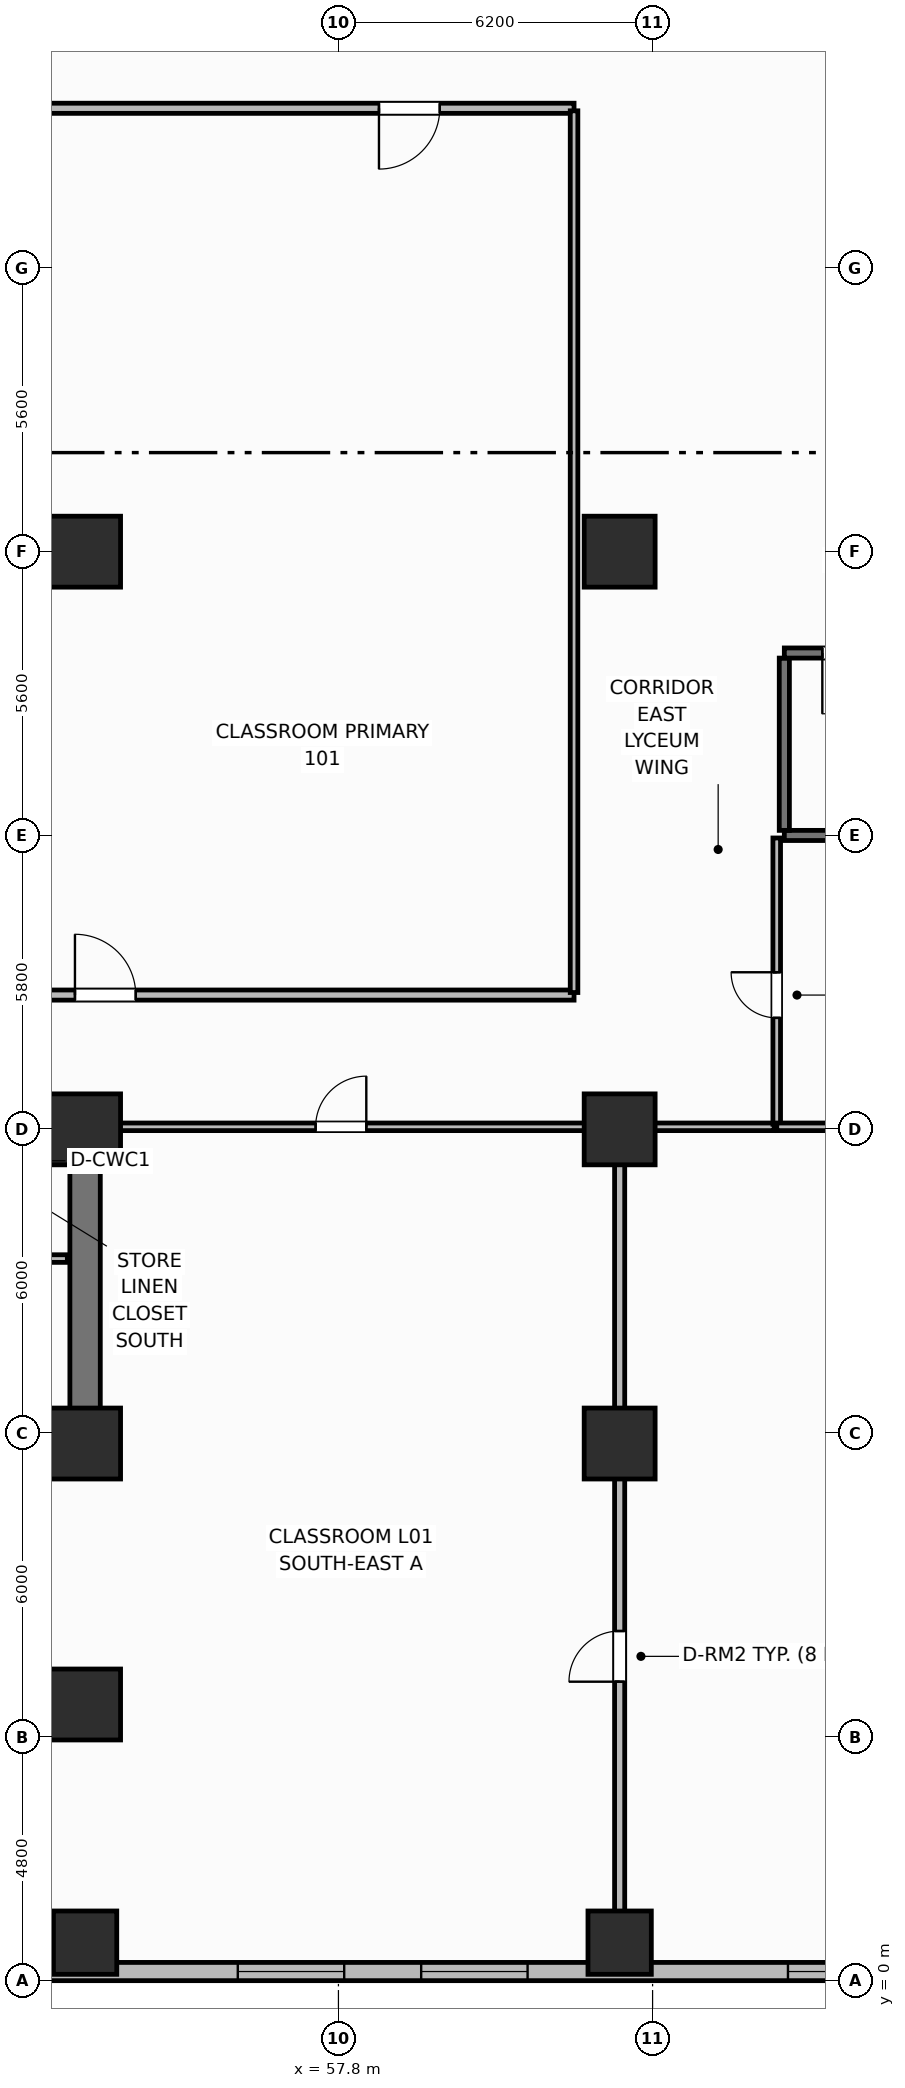
"""IFC4 building model, lengths in metres.
Left out: names, types, materials, properties, quantities, classifications, styles, units other than length and angle.
Written with IfcOpenShell. Run it as: python <this file> out.ifc"""

import sys

from ifc_helpers import new_model, si_unit, direction, frame, frame_2d, origin, origin_2d, place, context, subcontext, project, spatial, rectangle, extrude, element, fill, save


model = new_model("IFC4")
c1 = context("Model", 3, precision=1e-05, world=origin(), true_north=direction((0.0, 1.0)))
c2 = subcontext(c1, "Body", "Model", "MODEL_VIEW")
j1 = project(units=[si_unit("LENGTHUNIT", "METRE"), si_unit("PLANEANGLEUNIT", "RADIAN")], contexts=[c1])
p1 = place(None, origin())
s1 = spatial("IfcSite", under=j1, at=p1, CompositionType="ELEMENT")
p2 = place(p1, origin())
s2 = spatial("IfcBuilding", under=s1, at=p2, CompositionType="ELEMENT")
p3 = place(p2, frame((0.0, 0.0, 6.6)))
s3 = spatial("IfcBuildingStorey", under=s2, at=p3, CompositionType="ELEMENT", Elevation=6.6)
p4 = place(p3, frame((52.8, 10.6, 0.0), z_axis=(0.0, 0.0, 1.0), x_axis=(-1.0, 0.0, 0.0)))
e1 = element("IfcWall", 1, at=p4, inside=s3, PredefinedType="SHEAR", context=c2, shape_type="SweptSolid", body=[
    extrude(rectangle(XDim=27.2, YDim=0.6, at=frame_2d((13.6, 0.0))), origin(), (0.0, 0.0, 1.0), 4.5),
])
p5 = place(p3, frame((52.8, 10.9, 0.0), z_axis=(0.0, 0.0, 1.0), x_axis=(0.0, 1.0, 0.0)))
e2 = element("IfcWall", 2, at=p5, inside=s3, PredefinedType="SHEAR", context=c2, shape_type="SweptSolid", body=[
    extrude(rectangle(XDim=5.6, YDim=0.6, at=frame_2d((2.8, 0.0))), origin(), (0.0, 0.0, 1.0), 4.5),
])
p6 = place(p3, frame((25.6, 16.8, 0.0), z_axis=(0.0, 0.0, 1.0), x_axis=(1.0, 0.0, 0.0)))
e3 = element("IfcWall", 3, at=p6, inside=s3, PredefinedType="SHEAR", context=c2, shape_type="SweptSolid", body=[
    extrude(rectangle(XDim=27.2, YDim=0.6, at=frame_2d((13.6, 0.0))), origin(), (0.0, 0.0, 1.0), 4.5),
])
p7 = place(p6, frame((1.8, 0.0, 0.0)))
e4 = element("IfcOpeningElement", 4, at=p7, cuts=e3, PredefinedType="OPENING", context=c2, shape_type="SweptSolid", body=[
    extrude(rectangle(XDim=1.1, YDim=2.15, at=frame_2d((0.55, 1.075))), frame((0.0, 0.31, 0.0), z_axis=(0.0, -1.0, 0.0), x_axis=(1.0, 0.0, 0.0)), (0.0, 0.0, 1.0), 0.62),
])
p8 = place(p6, frame((5.6, 0.0, 0.0)))
e5 = element("IfcOpeningElement", 5, at=p8, cuts=e3, PredefinedType="OPENING", context=c2, shape_type="SweptSolid", body=[
    extrude(rectangle(XDim=0.85, YDim=2.1, at=frame_2d((0.425, 1.05))), frame((0.0, 0.31, 0.0), z_axis=(0.0, -1.0, 0.0), x_axis=(1.0, 0.0, 0.0)), (0.0, 0.0, 1.0), 0.62),
])
p9 = place(p6, frame((13.0, 0.0, 0.0)))
e6 = element("IfcOpeningElement", 6, at=p9, cuts=e3, PredefinedType="OPENING", context=c2, shape_type="SweptSolid", body=[
    extrude(rectangle(XDim=1.2, YDim=2.15, at=frame_2d((0.6, 1.075))), frame((0.0, 0.31, 0.0), z_axis=(0.0, -1.0, 0.0), x_axis=(1.0, 0.0, 0.0)), (0.0, 0.0, 1.0), 0.62),
])
p10 = place(p6, frame((20.4, 0.0, 0.0)))
e7 = element("IfcOpeningElement", 7, at=p10, cuts=e3, PredefinedType="OPENING", context=c2, shape_type="SweptSolid", body=[
    extrude(rectangle(XDim=1.3, YDim=2.2, at=frame_2d((0.65, 1.1))), frame((0.0, 0.31, 0.0), z_axis=(0.0, -1.0, 0.0), x_axis=(1.0, 0.0, 0.0)), (0.0, 0.0, 1.0), 0.62),
])
p11 = place(p6, frame((24.65, 0.0, 0.0)))
e8 = element("IfcOpeningElement", 8, at=p11, cuts=e3, PredefinedType="OPENING", context=c2, shape_type="SweptSolid", body=[
    extrude(rectangle(XDim=0.85, YDim=2.1, at=frame_2d((0.425, 1.05))), frame((0.0, 0.31, 0.0), z_axis=(0.0, -1.0, 0.0), x_axis=(1.0, 0.0, 0.0)), (0.0, 0.0, 1.0), 0.62),
])
for number, where, z_axis, x_axis in (
    (9, (52.8, 10.6, 0.0), (0.0, 0.0, 1.0), (1.0, 0.0, 0.0)),
    (10, (52.8, 16.8, 0.0), (0.0, 0.0, 1.0), (1.0, 0.0, 0.0)),
    (11, (52.8, 28.2, 0.0), (0.0, 0.0, 1.0), (1.0, 0.0, 0.0)),
):
    element("IfcColumn", number, at=place(p3, frame(where, z_axis=z_axis, x_axis=x_axis)), inside=s3, PredefinedType="COLUMN", context=c2, shape_type="SweptSolid", body=[
        extrude(rectangle(XDim=1.4, YDim=1.4, at=origin_2d()), origin(), (0.0, 0.0, 1.0), 4.5),
    ])
for number, where, z_axis, x_axis in (
    (12, (52.8, 0.75, 0.0), (0.0, 0.0, 1.0), (1.0, 0.0, 0.0)),
    (13, (63.35, 0.75, 0.0), (0.0, 0.0, 1.0), (1.0, 0.0, 0.0)),
):
    element("IfcColumn", number, at=place(p3, frame(where, z_axis=z_axis, x_axis=x_axis)), inside=s3, PredefinedType="COLUMN", context=c2, shape_type="SweptSolid", body=[
        extrude(rectangle(XDim=1.25, YDim=1.25, at=origin_2d()), origin(), (0.0, 0.0, 1.0), 4.5),
    ])
for number, where, z_axis, x_axis in (
    (14, (52.8, 5.45, 0.0), (0.0, 0.0, 1.0), (1.0, 0.0, 0.0)),
    (15, (63.35, 10.6, 0.0), (0.0, 0.0, 1.0), (1.0, 0.0, 0.0)),
    (16, (63.35, 16.8, 0.0), (0.0, 0.0, 1.0), (1.0, 0.0, 0.0)),
    (17, (63.35, 28.2, 0.0), (0.0, 0.0, 1.0), (1.0, 0.0, 0.0)),
):
    element("IfcColumn", number, at=place(p3, frame(where, z_axis=z_axis, x_axis=x_axis)), inside=s3, PredefinedType="COLUMN", context=c2, shape_type="SweptSolid", body=[
        extrude(rectangle(XDim=1.4, YDim=1.4, at=origin_2d()), origin(), (0.0, 0.0, 1.0), 4.5),
    ])
p12 = place(p3, frame((21.83, 0.18, 0.0), z_axis=(0.0, 0.0, 1.0), x_axis=(1.0, 0.0, 0.0)))
e18 = element("IfcWall", 18, at=p12, inside=s3, PredefinedType="SOLIDWALL", context=c2, shape_type="SweptSolid", body=[
    extrude(rectangle(XDim=55.59, YDim=0.36, at=frame_2d((27.795, 0.0))), origin(), (0.0, 0.0, 1.0), 3.48),
])
p13 = place(p12, frame((5.029, 0.0, 0.85)))
e19 = element("IfcOpeningElement", 19, at=p13, cuts=e18, PredefinedType="OPENING", context=c2, shape_type="SweptSolid", body=[
    extrude(rectangle(XDim=2.1, YDim=2.2, at=frame_2d((1.05, 1.1))), frame((0.0, 0.19, 0.0), z_axis=(0.0, -1.0, 0.0), x_axis=(1.0, 0.0, 0.0)), (0.0, 0.0, 1.0), 0.38),
])
p14 = place(p12, frame((8.648, 0.0, 0.85)))
e20 = element("IfcOpeningElement", 20, at=p14, cuts=e18, PredefinedType="OPENING", context=c2, shape_type="SweptSolid", body=[
    extrude(rectangle(XDim=2.1, YDim=2.2, at=frame_2d((1.05, 1.1))), frame((0.0, 0.19, 0.0), z_axis=(0.0, -1.0, 0.0), x_axis=(1.0, 0.0, 0.0)), (0.0, 0.0, 1.0), 0.38),
])
p15 = place(p12, frame((12.268, 0.0, 0.85)))
e21 = element("IfcOpeningElement", 21, at=p15, cuts=e18, PredefinedType="OPENING", context=c2, shape_type="SweptSolid", body=[
    extrude(rectangle(XDim=2.1, YDim=2.2, at=frame_2d((1.05, 1.1))), frame((0.0, 0.19, 0.0), z_axis=(0.0, -1.0, 0.0), x_axis=(1.0, 0.0, 0.0)), (0.0, 0.0, 1.0), 0.38),
])
p16 = place(p12, frame((19.506, 0.0, 0.85)))
e22 = element("IfcOpeningElement", 22, at=p16, cuts=e18, PredefinedType="OPENING", context=c2, shape_type="SweptSolid", body=[
    extrude(rectangle(XDim=2.1, YDim=2.2, at=frame_2d((1.05, 1.1))), frame((0.0, 0.19, 0.0), z_axis=(0.0, -1.0, 0.0), x_axis=(1.0, 0.0, 0.0)), (0.0, 0.0, 1.0), 0.38),
])
p17 = place(p12, frame((23.126, 0.0, 0.85)))
e23 = element("IfcOpeningElement", 23, at=p17, cuts=e18, PredefinedType="OPENING", context=c2, shape_type="SweptSolid", body=[
    extrude(rectangle(XDim=2.1, YDim=2.2, at=frame_2d((1.05, 1.1))), frame((0.0, 0.19, 0.0), z_axis=(0.0, -1.0, 0.0), x_axis=(1.0, 0.0, 0.0)), (0.0, 0.0, 1.0), 0.38),
])
p18 = place(p12, frame((26.745, 0.0, 0.85)))
e24 = element("IfcOpeningElement", 24, at=p18, cuts=e18, PredefinedType="OPENING", context=c2, shape_type="SweptSolid", body=[
    extrude(rectangle(XDim=2.1, YDim=2.2, at=frame_2d((1.05, 1.1))), frame((0.0, 0.19, 0.0), z_axis=(0.0, -1.0, 0.0), x_axis=(1.0, 0.0, 0.0)), (0.0, 0.0, 1.0), 0.38),
])
p19 = place(p12, frame((33.984, 0.0, 0.85)))
e25 = element("IfcOpeningElement", 25, at=p19, cuts=e18, PredefinedType="OPENING", context=c2, shape_type="SweptSolid", body=[
    extrude(rectangle(XDim=2.1, YDim=2.2, at=frame_2d((1.05, 1.1))), frame((0.0, 0.19, 0.0), z_axis=(0.0, -1.0, 0.0), x_axis=(1.0, 0.0, 0.0)), (0.0, 0.0, 1.0), 0.38),
])
p20 = place(p12, frame((37.603, 0.0, 0.85)))
e26 = element("IfcOpeningElement", 26, at=p20, cuts=e18, PredefinedType="OPENING", context=c2, shape_type="SweptSolid", body=[
    extrude(rectangle(XDim=2.1, YDim=2.2, at=frame_2d((1.05, 1.1))), frame((0.0, 0.19, 0.0), z_axis=(0.0, -1.0, 0.0), x_axis=(1.0, 0.0, 0.0)), (0.0, 0.0, 1.0), 0.38),
])
p21 = place(p12, frame((44.842, 0.0, 0.85)))
e27 = element("IfcOpeningElement", 27, at=p21, cuts=e18, PredefinedType="OPENING", context=c2, shape_type="SweptSolid", body=[
    extrude(rectangle(XDim=2.1, YDim=2.2, at=frame_2d((1.05, 1.1))), frame((0.0, 0.19, 0.0), z_axis=(0.0, -1.0, 0.0), x_axis=(1.0, 0.0, 0.0)), (0.0, 0.0, 1.0), 0.38),
])
p22 = place(p12, frame((52.08, 0.0, 0.85)))
e28 = element("IfcOpeningElement", 28, at=p22, cuts=e18, PredefinedType="OPENING", context=c2, shape_type="SweptSolid", body=[
    extrude(rectangle(XDim=2.1, YDim=2.2, at=frame_2d((1.05, 1.1))), frame((0.0, 0.19, 0.0), z_axis=(0.0, -1.0, 0.0), x_axis=(1.0, 0.0, 0.0)), (0.0, 0.0, 1.0), 0.38),
])
p23 = place(p3, frame((49.6, 14.25, 0.0), z_axis=(0.0, 0.0, 1.0), x_axis=(1.0, 0.0, 0.0)))
e29 = element("IfcWall", 29, at=p23, inside=s3, PredefinedType="PARTITIONING", context=c2, shape_type="SweptSolid", body=[
    extrude(rectangle(XDim=2.85, YDim=0.15, at=frame_2d((1.425, 0.0))), origin(), (0.0, 0.0, 1.0), 3.42),
])
p24 = place(p23, frame((0.9, 0.0, 0.0)))
e30 = element("IfcOpeningElement", 30, at=p24, cuts=e29, PredefinedType="OPENING", context=c2, shape_type="SweptSolid", body=[
    extrude(rectangle(XDim=0.85, YDim=2.1, at=frame_2d((0.425, 1.05))), frame((0.0, 0.085, 0.0), z_axis=(0.0, -1.0, 0.0), x_axis=(1.0, 0.0, 0.0)), (0.0, 0.0, 1.0), 0.17),
])
p25 = place(p3, frame((66.6, 22.6, 0.0), z_axis=(0.0, 0.0, 1.0), x_axis=(1.0, 0.0, 0.0)))
e31 = element("IfcWall", 31, at=p25, inside=s3, PredefinedType="SHEAR", context=c2, shape_type="SweptSolid", body=[
    extrude(rectangle(XDim=9.0, YDim=0.2, at=frame_2d((4.5, 0.0))), origin(), (0.0, 0.0, 1.0), 4.5),
])
p26 = place(p3, frame((66.6, 22.7, 0.0), z_axis=(0.0, 0.0, 1.0), x_axis=(0.0, 1.0, 0.0)))
e32 = element("IfcWall", 32, at=p26, inside=s3, PredefinedType="SHEAR", context=c2, shape_type="SweptSolid", body=[
    extrude(rectangle(XDim=3.4, YDim=0.2, at=frame_2d((1.7, 0.0))), origin(), (0.0, 0.0, 1.0), 4.5),
])
p27 = place(p3, frame((75.6, 26.2, 0.0), z_axis=(0.0, 0.0, 1.0), x_axis=(-1.0, 0.0, 0.0)))
e33 = element("IfcWall", 33, at=p27, inside=s3, PredefinedType="SHEAR", context=c2, shape_type="SweptSolid", body=[
    extrude(rectangle(XDim=9.0, YDim=0.2, at=frame_2d((4.5, 0.0))), origin(), (0.0, 0.0, 1.0), 4.5),
])
p28 = place(p27, frame((7.05, 0.0, 0.0)))
e34 = element("IfcOpeningElement", 34, at=p28, cuts=e33, PredefinedType="OPENING", context=c2, shape_type="SweptSolid", body=[
    extrude(rectangle(XDim=1.2, YDim=2.15, at=frame_2d((0.6, 1.075))), frame((0.0, 0.11, 0.0), z_axis=(0.0, -1.0, 0.0), x_axis=(1.0, 0.0, 0.0)), (0.0, 0.0, 1.0), 0.22),
])
p29 = place(p3, frame((15.95, 19.45, 0.0), z_axis=(0.0, 0.0, 1.0), x_axis=(1.0, 0.0, 0.0)))
e35 = element("IfcWall", 35, at=p29, inside=s3, PredefinedType="PARTITIONING", context=c2, shape_type="SweptSolid", body=[
    extrude(rectangle(XDim=46.5, YDim=0.2, at=frame_2d((23.25, 0.0))), origin(), (0.0, 0.0, 1.0), 3.42),
])
p30 = place(p29, frame((2.65, 0.0, 0.0)))
e36 = element("IfcOpeningElement", 36, at=p30, cuts=e35, PredefinedType="OPENING", context=c2, shape_type="SweptSolid", body=[
    extrude(rectangle(XDim=1.2, YDim=2.15, at=frame_2d((0.6, 1.075))), frame((0.0, 0.11, 0.0), z_axis=(0.0, -1.0, 0.0), x_axis=(1.0, 0.0, 0.0)), (0.0, 0.0, 1.0), 0.22),
])
p31 = place(p29, frame((22.85, 0.0, 0.0)))
e37 = element("IfcOpeningElement", 37, at=p31, cuts=e35, PredefinedType="OPENING", context=c2, shape_type="SweptSolid", body=[
    extrude(rectangle(XDim=1.2, YDim=2.15, at=frame_2d((0.6, 1.075))), frame((0.0, 0.11, 0.0), z_axis=(0.0, -1.0, 0.0), x_axis=(1.0, 0.0, 0.0)), (0.0, 0.0, 1.0), 0.22),
])
p32 = place(p29, frame((36.65, 0.0, 0.0)))
e38 = element("IfcOpeningElement", 38, at=p32, cuts=e35, PredefinedType="OPENING", context=c2, shape_type="SweptSolid", body=[
    extrude(rectangle(XDim=1.2, YDim=2.15, at=frame_2d((0.6, 1.075))), frame((0.0, 0.11, 0.0), z_axis=(0.0, -1.0, 0.0), x_axis=(1.0, 0.0, 0.0)), (0.0, 0.0, 1.0), 0.22),
])
p33 = place(p3, frame((62.45, 36.95, 0.0), z_axis=(0.0, 0.0, 1.0), x_axis=(-1.0, 0.0, 0.0)))
e39 = element("IfcWall", 39, at=p33, inside=s3, PredefinedType="PARTITIONING", context=c2, shape_type="SweptSolid", body=[
    extrude(rectangle(XDim=46.5, YDim=0.2, at=frame_2d((23.25, 0.0))), origin(), (0.0, 0.0, 1.0), 3.42),
])
p34 = place(p33, frame((29.05, 0.0, 0.0)))
e40 = element("IfcOpeningElement", 40, at=p34, cuts=e39, PredefinedType="OPENING", context=c2, shape_type="SweptSolid", body=[
    extrude(rectangle(XDim=1.2, YDim=2.15, at=frame_2d((0.6, 1.075))), frame((0.0, 0.11, 0.0), z_axis=(0.0, -1.0, 0.0), x_axis=(1.0, 0.0, 0.0)), (0.0, 0.0, 1.0), 0.22),
])
p35 = place(p33, frame((15.25, 0.0, 0.0)))
e41 = element("IfcOpeningElement", 41, at=p35, cuts=e39, PredefinedType="OPENING", context=c2, shape_type="SweptSolid", body=[
    extrude(rectangle(XDim=1.2, YDim=2.15, at=frame_2d((0.6, 1.075))), frame((0.0, 0.11, 0.0), z_axis=(0.0, -1.0, 0.0), x_axis=(1.0, 0.0, 0.0)), (0.0, 0.0, 1.0), 0.22),
])
p36 = place(p33, frame((2.65, 0.0, 0.0)))
e42 = element("IfcOpeningElement", 42, at=p36, cuts=e39, PredefinedType="OPENING", context=c2, shape_type="SweptSolid", body=[
    extrude(rectangle(XDim=1.2, YDim=2.15, at=frame_2d((0.6, 1.075))), frame((0.0, 0.11, 0.0), z_axis=(0.0, -1.0, 0.0), x_axis=(1.0, 0.0, 0.0)), (0.0, 0.0, 1.0), 0.22),
])
p37 = place(p3, frame((62.45, 19.5, 0.0), z_axis=(0.0, 0.0, 1.0), x_axis=(0.0, 1.0, 0.0)))
e43 = element("IfcWall", 43, at=p37, inside=s3, PredefinedType="PARTITIONING", context=c2, shape_type="SweptSolid", body=[
    extrude(rectangle(XDim=17.4, YDim=0.15, at=frame_2d((8.7, 0.0))), origin(), (0.0, 0.0, 1.0), 3.42),
])
p38 = place(p3, frame((63.35, 0.4, 0.0), z_axis=(0.0, 0.0, 1.0), x_axis=(0.0, 1.0, 0.0)))
e44 = element("IfcWall", 44, at=p38, inside=s3, PredefinedType="PARTITIONING", context=c2, shape_type="SweptSolid", body=[
    extrude(rectangle(XDim=16.4, YDim=0.2, at=frame_2d((8.2, 0.0))), origin(), (0.0, 0.0, 1.0), 3.42),
])
p39 = place(p38, frame((5.5, 0.0, 0.0)))
e45 = element("IfcOpeningElement", 45, at=p39, cuts=e44, PredefinedType="OPENING", context=c2, shape_type="SweptSolid", body=[
    extrude(rectangle(XDim=1.0, YDim=2.15, at=frame_2d((0.5, 1.075))), frame((0.0, 0.11, 0.0), z_axis=(0.0, -1.0, 0.0), x_axis=(1.0, 0.0, 0.0)), (0.0, 0.0, 1.0), 0.22),
])
p40 = place(p3, frame((53.15, 16.85, 0.0), z_axis=(0.0, 0.0, 1.0), x_axis=(1.0, 0.0, 0.0)))
e46 = element("IfcWall", 46, at=p40, inside=s3, PredefinedType="PARTITIONING", context=c2, shape_type="SweptSolid", body=[
    extrude(rectangle(XDim=13.25, YDim=0.15, at=frame_2d((6.625, 0.0))), origin(), (0.0, 0.0, 1.0), 3.42),
])
p41 = place(p40, frame((4.2, 0.0, 0.0)))
e47 = element("IfcOpeningElement", 47, at=p41, cuts=e46, PredefinedType="OPENING", context=c2, shape_type="SweptSolid", body=[
    extrude(rectangle(XDim=1.0, YDim=2.15, at=frame_2d((0.5, 1.075))), frame((0.0, 0.085, 0.0), z_axis=(0.0, -1.0, 0.0), x_axis=(1.0, 0.0, 0.0)), (0.0, 0.0, 1.0), 0.17),
])
p42 = place(p3, frame((66.45, 16.9, 0.0), z_axis=(0.0, 0.0, 1.0), x_axis=(0.0, 1.0, 0.0)))
e48 = element("IfcWall", 48, at=p42, inside=s3, PredefinedType="PARTITIONING", context=c2, shape_type="SweptSolid", body=[
    extrude(rectangle(XDim=5.65, YDim=0.15, at=frame_2d((2.825, 0.0))), origin(), (0.0, 0.0, 1.0), 3.42),
])
p43 = place(p42, frame((2.1, 0.0, 0.0)))
e49 = element("IfcOpeningElement", 49, at=p43, cuts=e48, PredefinedType="OPENING", context=c2, shape_type="SweptSolid", body=[
    extrude(rectangle(XDim=0.9, YDim=2.1, at=frame_2d((0.45, 1.05))), frame((0.0, 0.085, 0.0), z_axis=(0.0, -1.0, 0.0), x_axis=(1.0, 0.0, 0.0)), (0.0, 0.0, 1.0), 0.17),
])
p44 = place(p3, frame((66.45, 16.85, 0.0), z_axis=(0.0, 0.0, 1.0), x_axis=(1.0, 0.0, 0.0)))
e50 = element("IfcWall", 50, at=p44, inside=s3, PredefinedType="PARTITIONING", context=c2, shape_type="SweptSolid", body=[
    extrude(rectangle(XDim=11.55, YDim=0.15, at=frame_2d((5.775, 0.0))), origin(), (0.0, 0.0, 1.0), 3.42),
])
p45 = place(p19, origin())
e51 = element("IfcWindow", 51, at=p45, inside=s3, PartitioningType="SINGLE_PANEL", PredefinedType="WINDOW", context=c2, shape_type="SweptSolid", body=[
    extrude(rectangle(XDim=2.1, YDim=2.2, at=frame_2d((1.05, 1.1))), frame((0.0, 0.03, 0.0), z_axis=(0.0, -1.0, 0.0), x_axis=(1.0, 0.0, 0.0)), (0.0, 0.0, 1.0), 0.06),
])
fill(e25, e51)
p46 = place(p20, origin())
e52 = element("IfcWindow", 52, at=p46, inside=s3, PartitioningType="SINGLE_PANEL", PredefinedType="WINDOW", context=c2, shape_type="SweptSolid", body=[
    extrude(rectangle(XDim=2.1, YDim=2.2, at=frame_2d((1.05, 1.1))), frame((0.0, 0.03, 0.0), z_axis=(0.0, -1.0, 0.0), x_axis=(1.0, 0.0, 0.0)), (0.0, 0.0, 1.0), 0.06),
])
fill(e26, e52)
p47 = place(p21, origin())
e53 = element("IfcWindow", 53, at=p47, inside=s3, PartitioningType="SINGLE_PANEL", PredefinedType="WINDOW", context=c2, shape_type="SweptSolid", body=[
    extrude(rectangle(XDim=2.1, YDim=2.2, at=frame_2d((1.05, 1.1))), frame((0.0, 0.03, 0.0), z_axis=(0.0, -1.0, 0.0), x_axis=(1.0, 0.0, 0.0)), (0.0, 0.0, 1.0), 0.06),
])
fill(e27, e53)
p48 = place(p28, origin())
e54 = element("IfcDoor", 54, at=p48, inside=s3, OperationType="SINGLE_SWING_RIGHT", PredefinedType="DOOR", context=c2, shape_type="SweptSolid", body=[
    extrude(rectangle(XDim=1.2, YDim=2.15, at=frame_2d((0.6, 1.075))), frame((0.0, 0.025, 0.0), z_axis=(0.0, -1.0, 0.0), x_axis=(1.0, 0.0, 0.0)), (0.0, 0.0, 1.0), 0.05),
])
fill(e34, e54)
p49 = place(p32, origin())
e55 = element("IfcDoor", 55, at=p49, inside=s3, OperationType="SINGLE_SWING_LEFT", PredefinedType="DOOR", context=c2, shape_type="SweptSolid", body=[
    extrude(rectangle(XDim=1.2, YDim=2.15, at=frame_2d((0.6, 1.075))), frame((0.0, 0.025, 0.0), z_axis=(0.0, -1.0, 0.0), x_axis=(1.0, 0.0, 0.0)), (0.0, 0.0, 1.0), 0.05),
])
fill(e38, e55)
p50 = place(p36, origin())
e56 = element("IfcDoor", 56, at=p50, inside=s3, OperationType="SINGLE_SWING_RIGHT", PredefinedType="DOOR", context=c2, shape_type="SweptSolid", body=[
    extrude(rectangle(XDim=1.2, YDim=2.15, at=frame_2d((0.6, 1.075))), frame((0.0, 0.025, 0.0), z_axis=(0.0, -1.0, 0.0), x_axis=(1.0, 0.0, 0.0)), (0.0, 0.0, 1.0), 0.05),
])
fill(e42, e56)
p51 = place(p39, origin())
e57 = element("IfcDoor", 57, at=p51, inside=s3, OperationType="SINGLE_SWING_LEFT", PredefinedType="DOOR", context=c2, shape_type="SweptSolid", body=[
    extrude(rectangle(XDim=1.0, YDim=2.15, at=frame_2d((0.5, 1.075))), frame((0.0, 0.025, 0.0), z_axis=(0.0, -1.0, 0.0), x_axis=(1.0, 0.0, 0.0)), (0.0, 0.0, 1.0), 0.05),
])
fill(e45, e57)
p52 = place(p41, origin())
e58 = element("IfcDoor", 58, at=p52, inside=s3, OperationType="SINGLE_SWING_RIGHT", PredefinedType="DOOR", context=c2, shape_type="SweptSolid", body=[
    extrude(rectangle(XDim=1.0, YDim=2.15, at=frame_2d((0.5, 1.075))), frame((0.0, 0.025, 0.0), z_axis=(0.0, -1.0, 0.0), x_axis=(1.0, 0.0, 0.0)), (0.0, 0.0, 1.0), 0.05),
])
fill(e47, e58)
p53 = place(p43, origin())
e59 = element("IfcDoor", 59, at=p53, inside=s3, OperationType="SINGLE_SWING_RIGHT", PredefinedType="DOOR", context=c2, shape_type="SweptSolid", body=[
    extrude(rectangle(XDim=0.9, YDim=2.1, at=frame_2d((0.45, 1.05))), frame((0.0, 0.025, 0.0), z_axis=(0.0, -1.0, 0.0), x_axis=(1.0, 0.0, 0.0)), (0.0, 0.0, 1.0), 0.05),
])
fill(e49, e59)
save(model, sys.argv[1])
